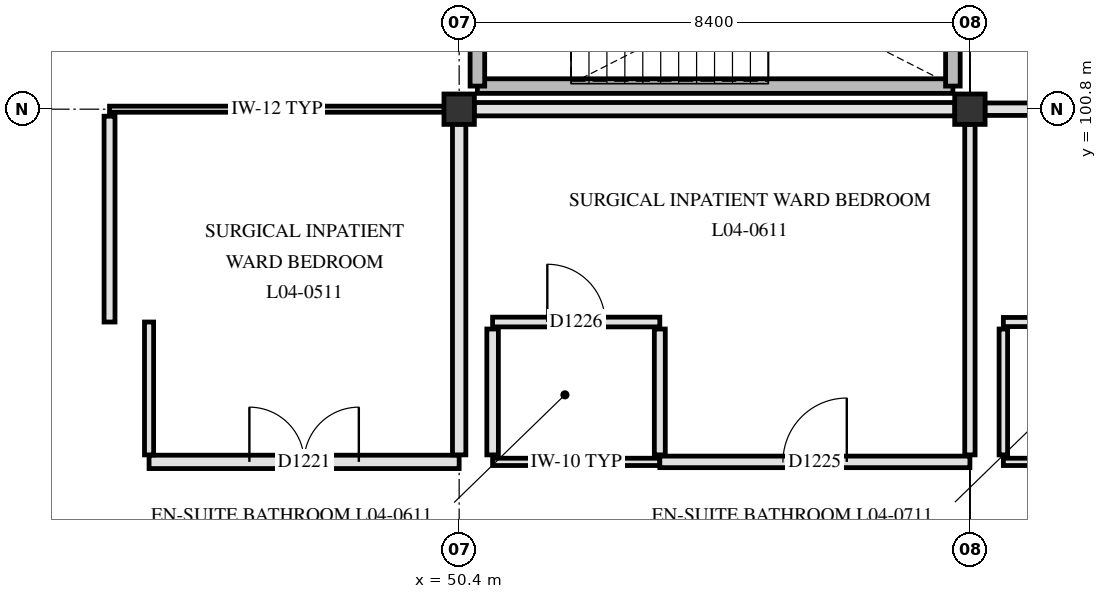
"""IFC4 building model, lengths in metres.
Left out: names, types, materials, properties, quantities, classifications, styles, units other than length and angle.
Written with IfcOpenShell. Run it as: python <this file> out.ifc"""

import sys

from ifc_helpers import new_model, si_unit, direction, frame, frame_2d, origin, origin_2d, place, context, subcontext, project, spatial, rectangle, extrude, element, fill, save


model = new_model("IFC4")
c1 = context("Model", 3, precision=1e-05, world=origin(), true_north=direction((0.0, 1.0)))
c2 = subcontext(c1, "Body", "Model", "MODEL_VIEW")
j1 = project(units=[si_unit("LENGTHUNIT", "METRE"), si_unit("PLANEANGLEUNIT", "RADIAN")], contexts=[c1])
p1 = place(None, origin())
s1 = spatial("IfcSite", under=j1, at=p1, CompositionType="ELEMENT")
p2 = place(p1, origin())
s2 = spatial("IfcBuilding", under=s1, at=p2, CompositionType="ELEMENT")
p3 = place(p2, frame((0.0, 0.0, 18.6)))
s3 = spatial("IfcBuildingStorey", under=s2, at=p3, CompositionType="ELEMENT", Elevation=18.6)
for number, where, z_axis, x_axis in (
    (1, (50.4, 100.8, 0.0), (0.0, 0.0, 1.0), (1.0, 0.0, 0.0)),
    (2, (58.8, 100.8, 0.0), (0.0, 0.0, 1.0), (1.0, 0.0, 0.0)),
):
    element("IfcColumn", number, at=place(p3, frame(where, z_axis=z_axis, x_axis=x_axis)), inside=s3, PredefinedType="COLUMN", context=c2, shape_type="SweptSolid", body=[
        extrude(rectangle(XDim=0.5, YDim=0.5, at=origin_2d()), origin(), (0.0, 0.0, 1.0), 3.9),
    ])
p4 = place(p3, frame((50.7, 101.18, 0.0), z_axis=(0.0, 0.0, 1.0), x_axis=(1.0, 0.0, 0.0)))
e3 = element("IfcWall", 3, at=p4, inside=s3, PredefinedType="SHEAR", context=c2, shape_type="SweptSolid", body=[
    extrude(rectangle(XDim=7.82, YDim=0.24, at=frame_2d((3.91, 0.0))), origin(), (0.0, 0.0, 1.0), 3.62),
])
for number, where, z_axis, x_axis in (
    (4, (50.7, 101.18, 0.0), (0.0, 0.0, 1.0), (0.0, 1.0, 0.0)),
    (5, (58.52, 101.18, 0.0), (0.0, 0.0, 1.0), (0.0, 1.0, 0.0)),
):
    element("IfcWall", number, at=place(p3, frame(where, z_axis=z_axis, x_axis=x_axis)), inside=s3, PredefinedType="SHEAR", context=c2, shape_type="SweptSolid", body=[
        extrude(rectangle(XDim=3.32, YDim=0.24, at=frame_2d((1.66, 0.0))), origin(), (0.0, 0.0, 1.0), 3.62),
    ])
p5 = place(p3, frame((45.3, 95.0, 0.0), z_axis=(0.0, 0.0, 1.0), x_axis=(1.0, 0.0, 0.0)))
e6 = element("IfcWall", 6, at=p5, inside=s3, PredefinedType="PARTITIONING", context=c2, shape_type="SweptSolid", body=[
    extrude(rectangle(XDim=5.1, YDim=0.22, at=frame_2d((2.55, 0.0))), origin(), (0.0, 0.0, 1.0), 3.25),
])
p6 = place(p5, frame((1.65, 0.0, 0.0)))
e7 = element("IfcOpeningElement", 7, at=p6, cuts=e6, PredefinedType="OPENING", context=c2, shape_type="SweptSolid", body=[
    extrude(rectangle(XDim=1.8, YDim=2.25, at=frame_2d((0.9, 1.125))), frame((0.0, 0.12, 0.0), z_axis=(0.0, -1.0, 0.0), x_axis=(1.0, 0.0, 0.0)), (0.0, 0.0, 1.0), 0.24),
])
p7 = place(p3, frame((50.95, 95.0, 0.0), z_axis=(0.0, 0.0, 1.0), x_axis=(1.0, 0.0, 0.0)))
e8 = element("IfcWall", 8, at=p7, inside=s3, PredefinedType="PARTITIONING", context=c2, shape_type="SweptSolid", body=[
    extrude(rectangle(XDim=2.75, YDim=0.12, at=frame_2d((1.375, 0.0))), origin(), (0.0, 0.0, 1.0), 3.61),
])
p8 = place(p3, frame((53.7, 95.0, 0.0), z_axis=(0.0, 0.0, 1.0), x_axis=(1.0, 0.0, 0.0)))
e9 = element("IfcWall", 9, at=p8, inside=s3, PredefinedType="PARTITIONING", context=c2, shape_type="SweptSolid", body=[
    extrude(rectangle(XDim=5.1, YDim=0.19, at=frame_2d((2.55, 0.0))), origin(), (0.0, 0.0, 1.0), 3.26),
])
p9 = place(p8, frame((2.025, 0.0, 0.0)))
e10 = element("IfcOpeningElement", 10, at=p9, cuts=e9, PredefinedType="OPENING", context=c2, shape_type="SweptSolid", body=[
    extrude(rectangle(XDim=1.05, YDim=2.15, at=frame_2d((0.525, 1.075))), frame((0.0, 0.105, 0.0), z_axis=(0.0, -1.0, 0.0), x_axis=(1.0, 0.0, 0.0)), (0.0, 0.0, 1.0), 0.21),
])
p10 = place(p3, frame((59.35, 95.0, 0.0), z_axis=(0.0, 0.0, 1.0), x_axis=(1.0, 0.0, 0.0)))
e11 = element("IfcWall", 11, at=p10, inside=s3, PredefinedType="PARTITIONING", context=c2, shape_type="SweptSolid", body=[
    extrude(rectangle(XDim=2.75, YDim=0.12, at=frame_2d((1.375, 0.0))), origin(), (0.0, 0.0, 1.0), 3.61),
])
p11 = place(p3, frame((50.95, 97.3, 0.0), z_axis=(0.0, 0.0, 1.0), x_axis=(1.0, 0.0, 0.0)))
e12 = element("IfcWall", 12, at=p11, inside=s3, PredefinedType="PARTITIONING", context=c2, shape_type="SweptSolid", body=[
    extrude(rectangle(XDim=2.75, YDim=0.16, at=frame_2d((1.375, 0.0))), origin(), (0.0, 0.0, 1.0), 3.61),
])
p12 = place(p11, frame((0.9, 0.0, 0.0)))
e13 = element("IfcOpeningElement", 13, at=p12, cuts=e12, PredefinedType="OPENING", context=c2, shape_type="SweptSolid", body=[
    extrude(rectangle(XDim=0.95, YDim=2.1, at=frame_2d((0.475, 1.05))), frame((0.0, 0.09, 0.0), z_axis=(0.0, -1.0, 0.0), x_axis=(1.0, 0.0, 0.0)), (0.0, 0.0, 1.0), 0.18),
])
p13 = place(p3, frame((59.35, 97.3, 0.0), z_axis=(0.0, 0.0, 1.0), x_axis=(1.0, 0.0, 0.0)))
e14 = element("IfcWall", 14, at=p13, inside=s3, PredefinedType="PARTITIONING", context=c2, shape_type="SweptSolid", body=[
    extrude(rectangle(XDim=2.75, YDim=0.15, at=frame_2d((1.375, 0.0))), origin(), (0.0, 0.0, 1.0), 3.61),
])
p14 = place(p13, frame((0.9, 0.0, 0.0)))
e15 = element("IfcOpeningElement", 15, at=p14, cuts=e14, PredefinedType="OPENING", context=c2, shape_type="SweptSolid", body=[
    extrude(rectangle(XDim=0.95, YDim=2.1, at=frame_2d((0.475, 1.05))), frame((0.0, 0.085, 0.0), z_axis=(0.0, -1.0, 0.0), x_axis=(1.0, 0.0, 0.0)), (0.0, 0.0, 1.0), 0.17),
])
p15 = place(p3, frame((44.65, 100.8, 0.0), z_axis=(0.0, 0.0, 1.0), x_axis=(1.0, 0.0, 0.0)))
e16 = element("IfcWall", 16, at=p15, inside=s3, PredefinedType="PARTITIONING", context=c2, shape_type="SweptSolid", body=[
    extrude(rectangle(XDim=5.505, YDim=0.1, at=frame_2d((2.752, 0.0))), origin(), (0.0, 0.0, 1.0), 3.15),
])
p16 = place(p3, frame((50.645, 100.8, 0.0), z_axis=(0.0, 0.0, 1.0), x_axis=(1.0, 0.0, 0.0)))
e17 = element("IfcWall", 17, at=p16, inside=s3, PredefinedType="PARTITIONING", context=c2, shape_type="SweptSolid", body=[
    extrude(rectangle(XDim=7.91, YDim=0.22, at=frame_2d((3.955, 0.0))), origin(), (0.0, 0.0, 1.0), 3.16),
])
p17 = place(p3, frame((59.045, 100.8, 0.0), z_axis=(0.0, 0.0, 1.0), x_axis=(1.0, 0.0, 0.0)))
e18 = element("IfcWall", 18, at=p17, inside=s3, PredefinedType="PARTITIONING", context=c2, shape_type="SweptSolid", body=[
    extrude(rectangle(XDim=7.86, YDim=0.205, at=frame_2d((3.93, 0.0))), origin(), (0.0, 0.0, 1.0), 3.16),
])
p18 = place(p3, frame((44.65, 97.3, 0.0), z_axis=(0.0, 0.0, 1.0), x_axis=(0.0, 1.0, 0.0)))
e19 = element("IfcWall", 19, at=p18, inside=s3, PredefinedType="PARTITIONING", context=c2, shape_type="SweptSolid", body=[
    extrude(rectangle(XDim=3.385, YDim=0.18, at=frame_2d((1.692, 0.0))), origin(), (0.0, 0.0, 1.0), 3.3),
])
p19 = place(p3, frame((45.3, 95.115, 0.0), z_axis=(0.0, 0.0, 1.0), x_axis=(0.0, 1.0, 0.0)))
e20 = element("IfcWall", 20, at=p19, inside=s3, PredefinedType="PARTITIONING", context=c2, shape_type="SweptSolid", body=[
    extrude(rectangle(XDim=2.185, YDim=0.15, at=frame_2d((1.093, 0.0))), origin(), (0.0, 0.0, 1.0), 3.3),
])
p20 = place(p3, frame((50.4, 95.115, 0.0), z_axis=(0.0, 0.0, 1.0), x_axis=(0.0, 1.0, 0.0)))
e21 = element("IfcWall", 21, at=p20, inside=s3, PredefinedType="PARTITIONING", context=c2, shape_type="SweptSolid", body=[
    extrude(rectangle(XDim=5.44, YDim=0.22, at=frame_2d((2.72, 0.0))), origin(), (0.0, 0.0, 1.0), 3.25),
])
p21 = place(p3, frame((50.95, 95.115, 0.0), z_axis=(0.0, 0.0, 1.0), x_axis=(0.0, 1.0, 0.0)))
e22 = element("IfcWall", 22, at=p21, inside=s3, PredefinedType="PARTITIONING", context=c2, shape_type="SweptSolid", body=[
    extrude(rectangle(XDim=2.07, YDim=0.19, at=frame_2d((1.035, 0.0))), origin(), (0.0, 0.0, 1.0), 3.31),
])
p22 = place(p3, frame((53.7, 95.115, 0.0), z_axis=(0.0, 0.0, 1.0), x_axis=(0.0, 1.0, 0.0)))
e23 = element("IfcWall", 23, at=p22, inside=s3, PredefinedType="PARTITIONING", context=c2, shape_type="SweptSolid", body=[
    extrude(rectangle(XDim=2.07, YDim=0.18, at=frame_2d((1.035, 0.0))), origin(), (0.0, 0.0, 1.0), 3.31),
])
p23 = place(p3, frame((58.8, 95.115, 0.0), z_axis=(0.0, 0.0, 1.0), x_axis=(0.0, 1.0, 0.0)))
e24 = element("IfcWall", 24, at=p23, inside=s3, PredefinedType="PARTITIONING", context=c2, shape_type="SweptSolid", body=[
    extrude(rectangle(XDim=5.44, YDim=0.17, at=frame_2d((2.72, 0.0))), origin(), (0.0, 0.0, 1.0), 3.26),
])
p24 = place(p3, frame((59.35, 95.115, 0.0), z_axis=(0.0, 0.0, 1.0), x_axis=(0.0, 1.0, 0.0)))
e25 = element("IfcWall", 25, at=p24, inside=s3, PredefinedType="PARTITIONING", context=c2, shape_type="SweptSolid", body=[
    extrude(rectangle(XDim=2.07, YDim=0.14, at=frame_2d((1.035, 0.0))), origin(), (0.0, 0.0, 1.0), 3.31),
])
p25 = place(p6, origin())
e26 = element("IfcDoor", 26, at=p25, inside=s3, OperationType="DOUBLE_SWING_RIGHT", PredefinedType="DOOR", context=c2, shape_type="SweptSolid", body=[
    extrude(rectangle(XDim=1.8, YDim=2.25, at=frame_2d((0.9, 1.125))), frame((0.0, 0.025, 0.0), z_axis=(0.0, -1.0, 0.0), x_axis=(1.0, 0.0, 0.0)), (0.0, 0.0, 1.0), 0.05),
])
fill(e7, e26)
p26 = place(p9, origin())
e27 = element("IfcDoor", 27, at=p26, inside=s3, OperationType="SINGLE_SWING_RIGHT", PredefinedType="DOOR", context=c2, shape_type="SweptSolid", body=[
    extrude(rectangle(XDim=1.05, YDim=2.15, at=frame_2d((0.525, 1.075))), frame((0.0, 0.025, 0.0), z_axis=(0.0, -1.0, 0.0), x_axis=(1.0, 0.0, 0.0)), (0.0, 0.0, 1.0), 0.05),
])
fill(e10, e27)
p27 = place(p12, origin())
e28 = element("IfcDoor", 28, at=p27, inside=s3, OperationType="SINGLE_SWING_LEFT", PredefinedType="DOOR", context=c2, shape_type="SweptSolid", body=[
    extrude(rectangle(XDim=0.95, YDim=2.1, at=frame_2d((0.475, 1.05))), frame((0.0, 0.025, 0.0), z_axis=(0.0, -1.0, 0.0), x_axis=(1.0, 0.0, 0.0)), (0.0, 0.0, 1.0), 0.05),
])
fill(e13, e28)
save(model, sys.argv[1])
